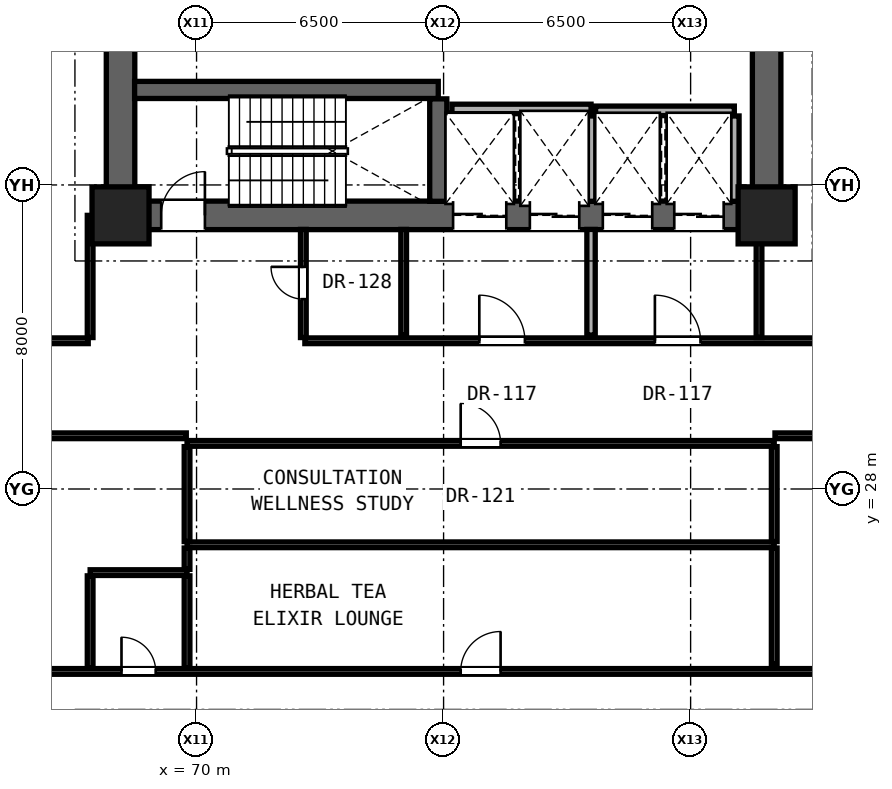
"""IFC4 building model, lengths in metres.
Left out: names, types, materials, properties, quantities, classifications, styles, units other than length and angle.
Written with IfcOpenShell. Run it as: python <this file> out.ifc"""

import sys

from ifc_helpers import new_model, si_unit, direction, frame, frame_2d, origin, origin_2d, place, context, subcontext, project, spatial, rectangle, extrude, element, fill, save


model = new_model("IFC4")
c1 = context("Model", 3, precision=1e-05, world=origin(), true_north=direction((0.0, 1.0)))
c2 = subcontext(c1, "Body", "Model", "MODEL_VIEW")
j1 = project(units=[si_unit("LENGTHUNIT", "METRE"), si_unit("PLANEANGLEUNIT", "RADIAN")], contexts=[c1])
p1 = place(None, origin())
s1 = spatial("IfcSite", under=j1, at=p1, CompositionType="ELEMENT")
p2 = place(p1, origin())
s2 = spatial("IfcBuilding", under=s1, at=p2, CompositionType="ELEMENT")
p3 = place(p2, frame((0.0, 0.0, 18.1)))
s3 = spatial("IfcBuildingStorey", under=s2, at=p3, CompositionType="ELEMENT", Elevation=18.1)
for number, where, z_axis, x_axis in (
    (1, (68.0, 35.2, 0.0), (0.0, 0.0, 1.0), (1.0, 0.0, 0.0)),
    (2, (85.0, 35.2, 0.0), (0.0, 0.0, 1.0), (1.0, 0.0, 0.0)),
):
    element("IfcColumn", number, at=place(p3, frame(where, z_axis=z_axis, x_axis=x_axis)), inside=s3, PredefinedType="COLUMN", context=c2, shape_type="SweptSolid", body=[
        extrude(rectangle(XDim=1.5, YDim=1.5, at=origin_2d()), origin(), (0.0, 0.0, 1.0), 4.3),
    ])
for number, where, z_axis, x_axis in (
    (3, (68.0, 35.2, 0.0), (0.0, 0.0, 1.0), (0.0, 1.0, 0.0)),
    (4, (85.0, 35.2, 0.0), (0.0, 0.0, 1.0), (0.0, 1.0, 0.0)),
):
    element("IfcWall", number, at=place(p3, frame(where, z_axis=z_axis, x_axis=x_axis)), inside=s3, PredefinedType="SHEAR", context=c2, shape_type="SweptSolid", body=[
        extrude(rectangle(XDim=5.6, YDim=0.75, at=frame_2d((2.8, 0.0))), origin(), (0.0, 0.0, 1.0), 3.65),
    ])
p4 = place(p3, frame((68.0, 35.2, 0.0), z_axis=(0.0, 0.0, 1.0), x_axis=(1.0, 0.0, 0.0)))
e5 = element("IfcWall", 5, at=p4, inside=s3, PredefinedType="SHEAR", context=c2, shape_type="SweptSolid", body=[
    extrude(rectangle(XDim=17.0, YDim=0.75, at=frame_2d((8.5, 0.0))), origin(), (0.0, 0.0, 1.0), 3.65),
])
p5 = place(p4, frame((1.07, 0.0, 0.0)))
e6 = element("IfcOpeningElement", 6, at=p5, cuts=e5, PredefinedType="OPENING", context=c2, shape_type="SweptSolid", body=[
    extrude(rectangle(XDim=1.15, YDim=2.2, at=frame_2d((0.575, 1.1))), frame((0.0, 0.385, 0.0), z_axis=(0.0, -1.0, 0.0), x_axis=(1.0, 0.0, 0.0)), (0.0, 0.0, 1.0), 0.77),
])
p6 = place(p4, frame((8.75, 0.0, 0.0)))
e7 = element("IfcOpeningElement", 7, at=p6, cuts=e5, PredefinedType="OPENING", context=c2, shape_type="SweptSolid", body=[
    extrude(rectangle(XDim=1.4, YDim=2.35, at=frame_2d((0.7, 1.175))), frame((0.0, 0.385, 0.0), z_axis=(0.0, -1.0, 0.0), x_axis=(1.0, 0.0, 0.0)), (0.0, 0.0, 1.0), 0.77),
])
p7 = place(p4, frame((10.77, 0.0, 0.0)))
e8 = element("IfcOpeningElement", 8, at=p7, cuts=e5, PredefinedType="OPENING", context=c2, shape_type="SweptSolid", body=[
    extrude(rectangle(XDim=1.3, YDim=2.3, at=frame_2d((0.65, 1.15))), frame((0.0, 0.385, 0.0), z_axis=(0.0, -1.0, 0.0), x_axis=(1.0, 0.0, 0.0)), (0.0, 0.0, 1.0), 0.77),
])
p8 = place(p4, frame((12.69, 0.0, 0.0)))
e9 = element("IfcOpeningElement", 9, at=p8, cuts=e5, PredefinedType="OPENING", context=c2, shape_type="SweptSolid", body=[
    extrude(rectangle(XDim=1.3, YDim=2.3, at=frame_2d((0.65, 1.15))), frame((0.0, 0.385, 0.0), z_axis=(0.0, -1.0, 0.0), x_axis=(1.0, 0.0, 0.0)), (0.0, 0.0, 1.0), 0.77),
])
p9 = place(p4, frame((14.57, 0.0, 0.0)))
e10 = element("IfcOpeningElement", 10, at=p9, cuts=e5, PredefinedType="OPENING", context=c2, shape_type="SweptSolid", body=[
    extrude(rectangle(XDim=1.3, YDim=2.3, at=frame_2d((0.65, 1.15))), frame((0.0, 0.385, 0.0), z_axis=(0.0, -1.0, 0.0), x_axis=(1.0, 0.0, 0.0)), (0.0, 0.0, 1.0), 0.77),
])
p10 = place(p3, frame((61.8, 23.2, 0.0), z_axis=(0.0, 0.0, 1.0), x_axis=(1.0, 0.0, 0.0)))
e11 = element("IfcWall", 11, at=p10, inside=s3, PredefinedType="PARTITIONING", context=c2, shape_type="SweptSolid", body=[
    extrude(rectangle(XDim=29.15, YDim=0.15, at=frame_2d((14.575, 0.0))), origin(), (0.0, 0.0, 1.0), 2.715),
])
p11 = place(p10, frame((6.225, 0.0, 0.0)))
e12 = element("IfcOpeningElement", 12, at=p11, cuts=e11, PredefinedType="OPENING", context=c2, shape_type="SweptSolid", body=[
    extrude(rectangle(XDim=0.9, YDim=2.1, at=frame_2d((0.45, 1.05))), frame((0.0, 0.085, 0.0), z_axis=(0.0, -1.0, 0.0), x_axis=(1.0, 0.0, 0.0)), (0.0, 0.0, 1.0), 0.17),
])
p12 = place(p10, frame((15.15, 0.0, 0.0)))
e13 = element("IfcOpeningElement", 13, at=p12, cuts=e11, PredefinedType="OPENING", context=c2, shape_type="SweptSolid", body=[
    extrude(rectangle(XDim=1.05, YDim=2.2, at=frame_2d((0.525, 1.1))), frame((0.0, 0.085, 0.0), z_axis=(0.0, -1.0, 0.0), x_axis=(1.0, 0.0, 0.0)), (0.0, 0.0, 1.0), 0.17),
])
p13 = place(p3, frame((67.2, 25.8, 0.0), z_axis=(0.0, 0.0, 1.0), x_axis=(1.0, 0.0, 0.0)))
e14 = element("IfcWall", 14, at=p13, inside=s3, PredefinedType="PARTITIONING", context=c2, shape_type="SweptSolid", body=[
    extrude(rectangle(XDim=2.55, YDim=0.15, at=frame_2d((1.275, 0.0))), origin(), (0.0, 0.0, 1.0), 2.715),
])
p14 = place(p3, frame((69.75, 26.532, 0.0), z_axis=(0.0, 0.0, 1.0), x_axis=(1.0, 0.0, 0.0)))
e15 = element("IfcWall", 15, at=p14, inside=s3, PredefinedType="PARTITIONING", context=c2, shape_type="SweptSolid", body=[
    extrude(rectangle(XDim=15.45, YDim=0.15, at=frame_2d((7.725, 0.0))), origin(), (0.0, 0.0, 1.0), 2.715),
])
p15 = place(p3, frame((69.75, 29.2, 0.0), z_axis=(0.0, 0.0, 1.0), x_axis=(1.0, 0.0, 0.0)))
e16 = element("IfcWall", 16, at=p15, inside=s3, PredefinedType="PARTITIONING", context=c2, shape_type="SweptSolid", body=[
    extrude(rectangle(XDim=15.45, YDim=0.15, at=frame_2d((7.725, 0.0))), origin(), (0.0, 0.0, 1.0), 2.715),
])
p16 = place(p15, frame((7.2, 0.0, 0.0)))
e17 = element("IfcOpeningElement", 17, at=p16, cuts=e16, PredefinedType="OPENING", context=c2, shape_type="SweptSolid", body=[
    extrude(rectangle(XDim=1.05, YDim=2.2, at=frame_2d((0.525, 1.1))), frame((0.0, 0.085, 0.0), z_axis=(0.0, -1.0, 0.0), x_axis=(1.0, 0.0, 0.0)), (0.0, 0.0, 1.0), 0.17),
])
p17 = place(p3, frame((61.8, 29.4, 0.0), z_axis=(0.0, 0.0, 1.0), x_axis=(1.0, 0.0, 0.0)))
e18 = element("IfcWall", 18, at=p17, inside=s3, PredefinedType="PARTITIONING", context=c2, shape_type="SweptSolid", body=[
    extrude(rectangle(XDim=7.93, YDim=0.15, at=frame_2d((3.965, 0.0))), origin(), (0.0, 0.0, 1.0), 2.715),
])
p18 = place(p3, frame((85.22, 29.4, 0.0), z_axis=(0.0, 0.0, 1.0), x_axis=(1.0, 0.0, 0.0)))
e19 = element("IfcWall", 19, at=p18, inside=s3, PredefinedType="PARTITIONING", context=c2, shape_type="SweptSolid", body=[
    extrude(rectangle(XDim=5.73, YDim=0.15, at=frame_2d((2.865, 0.0))), origin(), (0.0, 0.0, 1.0), 2.786),
])
p19 = place(p3, frame((61.8, 31.9, 0.0), z_axis=(0.0, 0.0, 1.0), x_axis=(1.0, 0.0, 0.0)))
e20 = element("IfcWall", 20, at=p19, inside=s3, PredefinedType="PARTITIONING", context=c2, shape_type="SweptSolid", body=[
    extrude(rectangle(XDim=5.35, YDim=0.15, at=frame_2d((2.675, 0.0))), origin(), (0.0, 0.0, 1.0), 3.65),
])
p20 = place(p3, frame((72.85, 31.9, 0.0), z_axis=(0.0, 0.0, 1.0), x_axis=(1.0, 0.0, 0.0)))
e21 = element("IfcWall", 21, at=p20, inside=s3, PredefinedType="PARTITIONING", context=c2, shape_type="SweptSolid", body=[
    extrude(rectangle(XDim=18.1, YDim=0.15, at=frame_2d((9.05, 0.0))), origin(), (0.0, 0.0, 1.0), 2.715),
])
p21 = place(p20, frame((9.21, 0.0, 0.0)))
e22 = element("IfcOpeningElement", 22, at=p21, cuts=e21, PredefinedType="OPENING", context=c2, shape_type="SweptSolid", body=[
    extrude(rectangle(XDim=1.2, YDim=2.25, at=frame_2d((0.6, 1.125))), frame((0.0, 0.085, 0.0), z_axis=(0.0, -1.0, 0.0), x_axis=(1.0, 0.0, 0.0)), (0.0, 0.0, 1.0), 0.17),
])
p22 = place(p20, frame((4.59, 0.0, 0.0)))
e23 = element("IfcOpeningElement", 23, at=p22, cuts=e21, PredefinedType="OPENING", context=c2, shape_type="SweptSolid", body=[
    extrude(rectangle(XDim=1.2, YDim=2.25, at=frame_2d((0.6, 1.125))), frame((0.0, 0.085, 0.0), z_axis=(0.0, -1.0, 0.0), x_axis=(1.0, 0.0, 0.0)), (0.0, 0.0, 1.0), 0.17),
])
p23 = place(p3, frame((80.5, 37.95, 0.0), z_axis=(0.0, 0.0, 1.0), x_axis=(1.0, 0.0, 0.0)))
e24 = element("IfcWall", 24, at=p23, inside=s3, PredefinedType="SOLIDWALL", context=c2, shape_type="SweptSolid", body=[
    extrude(rectangle(XDim=3.65, YDim=0.25, at=frame_2d((1.825, 0.0))), origin(), (0.0, 0.0, 1.0), 3.65),
])
p24 = place(p3, frame((76.72, 38.0, 0.0), z_axis=(0.0, 0.0, 1.0), x_axis=(1.0, 0.0, 0.0)))
e25 = element("IfcWall", 25, at=p24, inside=s3, PredefinedType="SOLIDWALL", context=c2, shape_type="SweptSolid", body=[
    extrude(rectangle(XDim=3.66, YDim=0.25, at=frame_2d((1.83, 0.0))), origin(), (0.0, 0.0, 1.0), 3.65),
])
p25 = place(p3, frame((68.37, 38.5, 0.0), z_axis=(0.0, 0.0, 1.0), x_axis=(1.0, 0.0, 0.0)))
e26 = element("IfcWall", 26, at=p25, inside=s3, PredefinedType="SHEAR", context=c2, shape_type="SweptSolid", body=[
    extrude(rectangle(XDim=7.99, YDim=0.45, at=frame_2d((3.995, 0.0))), origin(), (0.0, 0.0, 1.0), 3.65),
])
p26 = place(p3, frame((67.2, 23.285, 0.0), z_axis=(0.0, 0.0, 1.0), x_axis=(0.0, 1.0, 0.0)))
e27 = element("IfcWall", 27, at=p26, inside=s3, PredefinedType="PARTITIONING", context=c2, shape_type="SweptSolid", body=[
    extrude(rectangle(XDim=2.43, YDim=0.15, at=frame_2d((1.215, 0.0))), origin(), (0.0, 0.0, 1.0), 3.65),
])
p27 = place(p3, frame((67.2, 31.985, 0.0), z_axis=(0.0, 0.0, 1.0), x_axis=(0.0, 1.0, 0.0)))
e28 = element("IfcWall", 28, at=p27, inside=s3, PredefinedType="PARTITIONING", context=c2, shape_type="SweptSolid", body=[
    extrude(rectangle(XDim=3.215, YDim=0.15, at=frame_2d((1.607, 0.0))), origin(), (0.0, 0.0, 1.0), 2.542),
])
p28 = place(p3, frame((69.75, 23.285, 0.0), z_axis=(0.0, 0.0, 1.0), x_axis=(0.0, 1.0, 0.0)))
e29 = element("IfcWall", 29, at=p28, inside=s3, PredefinedType="PARTITIONING", context=c2, shape_type="SweptSolid", body=[
    extrude(rectangle(XDim=2.43, YDim=0.15, at=frame_2d((1.215, 0.0))), origin(), (0.0, 0.0, 1.0), 3.65),
])
p29 = place(p3, frame((69.75, 25.885, 0.0), z_axis=(0.0, 0.0, 1.0), x_axis=(0.0, 1.0, 0.0)))
e30 = element("IfcWall", 30, at=p29, inside=s3, PredefinedType="PARTITIONING", context=c2, shape_type="SweptSolid", body=[
    extrude(rectangle(XDim=0.562, YDim=0.15, at=frame_2d((0.281, 0.0))), origin(), (0.0, 0.0, 1.0), 3.65),
])
p30 = place(p3, frame((69.75, 26.617, 0.0), z_axis=(0.0, 0.0, 1.0), x_axis=(0.0, 1.0, 0.0)))
e31 = element("IfcWall", 31, at=p30, inside=s3, PredefinedType="PARTITIONING", context=c2, shape_type="SweptSolid", body=[
    extrude(rectangle(XDim=2.498, YDim=0.15, at=frame_2d((1.249, 0.0))), origin(), (0.0, 0.0, 1.0), 2.715),
])
p31 = place(p3, frame((72.81, 31.985, 0.0), z_axis=(0.0, 0.0, 1.0), x_axis=(0.0, 1.0, 0.0)))
e32 = element("IfcWall", 32, at=p31, inside=s3, PredefinedType="PARTITIONING", context=c2, shape_type="SweptSolid", body=[
    extrude(rectangle(XDim=2.845, YDim=0.15, at=frame_2d((1.422, 0.0))), origin(), (0.0, 0.0, 1.0), 3.65),
])
p32 = place(p31, frame((1.01, 0.0, 0.0)))
e33 = element("IfcOpeningElement", 33, at=p32, cuts=e32, PredefinedType="OPENING", context=c2, shape_type="SweptSolid", body=[
    extrude(rectangle(XDim=0.85, YDim=2.01, at=frame_2d((0.425, 1.005))), frame((0.0, 0.085, 0.0), z_axis=(0.0, -1.0, 0.0), x_axis=(1.0, 0.0, 0.0)), (0.0, 0.0, 1.0), 0.17),
])
p33 = place(p3, frame((75.45, 32.05, 0.0), z_axis=(0.0, 0.0, 1.0), x_axis=(0.0, 1.0, 0.0)))
e34 = element("IfcWall", 34, at=p33, inside=s3, PredefinedType="PARTITIONING", context=c2, shape_type="SweptSolid", body=[
    extrude(rectangle(XDim=2.78, YDim=0.15, at=frame_2d((1.39, 0.0))), origin(), (0.0, 0.0, 1.0), 3.65),
])
p34 = place(p3, frame((76.36, 35.57, 0.0), z_axis=(0.0, 0.0, 1.0), x_axis=(0.0, 1.0, 0.0)))
e35 = element("IfcWall", 35, at=p34, inside=s3, PredefinedType="SHEAR", context=c2, shape_type="SweptSolid", body=[
    extrude(rectangle(XDim=2.695, YDim=0.45, at=frame_2d((1.347, 0.0))), origin(), (0.0, 0.0, 1.0), 3.65),
])
p35 = place(p3, frame((80.38, 32.05, 0.0), z_axis=(0.0, 0.0, 1.0), x_axis=(0.0, 1.0, 0.0)))
e36 = element("IfcWall", 36, at=p35, inside=s3, PredefinedType="SOLIDWALL", context=c2, shape_type="SweptSolid", body=[
    extrude(rectangle(XDim=2.78, YDim=0.22, at=frame_2d((1.39, 0.0))), origin(), (0.0, 0.0, 1.0), 3.65),
])
for number, where, z_axis, x_axis in (
    (37, (80.38, 35.57, 0.0), (0.0, 0.0, 1.0), (0.0, 1.0, 0.0)),
    (38, (84.15, 35.57, 0.0), (0.0, 0.0, 1.0), (0.0, 1.0, 0.0)),
):
    element("IfcWall", number, at=place(p3, frame(where, z_axis=z_axis, x_axis=x_axis)), inside=s3, PredefinedType="SOLIDWALL", context=c2, shape_type="SweptSolid", body=[
        extrude(rectangle(XDim=2.245, YDim=0.25, at=frame_2d((1.123, 0.0))), origin(), (0.0, 0.0, 1.0), 3.65),
    ])
p36 = place(p3, frame((84.8, 31.985, 0.0), z_axis=(0.0, 0.0, 1.0), x_axis=(0.0, 1.0, 0.0)))
e39 = element("IfcWall", 39, at=p36, inside=s3, PredefinedType="PARTITIONING", context=c2, shape_type="SweptSolid", body=[
    extrude(rectangle(XDim=2.845, YDim=0.15, at=frame_2d((1.422, 0.0))), origin(), (0.0, 0.0, 1.0), 2.715),
])
p37 = place(p3, frame((85.2, 23.4, 0.0), z_axis=(0.0, 0.0, 1.0), x_axis=(0.0, 1.0, 0.0)))
e40 = element("IfcWall", 40, at=p37, inside=s3, PredefinedType="PARTITIONING", context=c2, shape_type="SweptSolid", body=[
    extrude(rectangle(XDim=3.047, YDim=0.15, at=frame_2d((1.523, 0.0))), origin(), (0.0, 0.0, 1.0), 2.715),
])
p38 = place(p3, frame((85.2, 26.617, 0.0), z_axis=(0.0, 0.0, 1.0), x_axis=(0.0, 1.0, 0.0)))
e41 = element("IfcWall", 41, at=p38, inside=s3, PredefinedType="PARTITIONING", context=c2, shape_type="SweptSolid", body=[
    extrude(rectangle(XDim=2.498, YDim=0.15, at=frame_2d((1.249, 0.0))), origin(), (0.0, 0.0, 1.0), 2.715),
])
p39 = place(p21, origin())
e42 = element("IfcDoor", 42, at=p39, inside=s3, OperationType="SINGLE_SWING_LEFT", PredefinedType="DOOR", context=c2, shape_type="SweptSolid", body=[
    extrude(rectangle(XDim=1.2, YDim=2.25, at=frame_2d((0.6, 1.125))), frame((0.0, 0.025, 0.0), z_axis=(0.0, -1.0, 0.0), x_axis=(1.0, 0.0, 0.0)), (0.0, 0.0, 1.0), 0.05),
])
fill(e22, e42)
p40 = place(p5, origin())
e43 = element("IfcDoor", 43, at=p40, inside=s3, OperationType="SINGLE_SWING_RIGHT", PredefinedType="DOOR", context=c2, shape_type="SweptSolid", body=[
    extrude(rectangle(XDim=1.15, YDim=2.2, at=frame_2d((0.575, 1.1))), frame((0.0, 0.025, 0.0), z_axis=(0.0, -1.0, 0.0), x_axis=(1.0, 0.0, 0.0)), (0.0, 0.0, 1.0), 0.05),
])
fill(e6, e43)
p41 = place(p22, origin())
e44 = element("IfcDoor", 44, at=p41, inside=s3, OperationType="SINGLE_SWING_LEFT", PredefinedType="DOOR", context=c2, shape_type="SweptSolid", body=[
    extrude(rectangle(XDim=1.2, YDim=2.25, at=frame_2d((0.6, 1.125))), frame((0.0, 0.025, 0.0), z_axis=(0.0, -1.0, 0.0), x_axis=(1.0, 0.0, 0.0)), (0.0, 0.0, 1.0), 0.05),
])
fill(e23, e44)
p42 = place(p32, origin())
e45 = element("IfcDoor", 45, at=p42, inside=s3, OperationType="SINGLE_SWING_RIGHT", PredefinedType="DOOR", context=c2, shape_type="SweptSolid", body=[
    extrude(rectangle(XDim=0.85, YDim=2.01, at=frame_2d((0.425, 1.005))), frame((0.0, 0.025, 0.0), z_axis=(0.0, -1.0, 0.0), x_axis=(1.0, 0.0, 0.0)), (0.0, 0.0, 1.0), 0.05),
])
fill(e33, e45)
p43 = place(p11, origin())
e46 = element("IfcDoor", 46, at=p43, inside=s3, OperationType="SINGLE_SWING_LEFT", PredefinedType="DOOR", context=c2, shape_type="SweptSolid", body=[
    extrude(rectangle(XDim=0.9, YDim=2.1, at=frame_2d((0.45, 1.05))), frame((0.0, 0.025, 0.0), z_axis=(0.0, -1.0, 0.0), x_axis=(1.0, 0.0, 0.0)), (0.0, 0.0, 1.0), 0.05),
])
fill(e12, e46)
p44 = place(p12, origin())
e47 = element("IfcDoor", 47, at=p44, inside=s3, OperationType="SINGLE_SWING_RIGHT", PredefinedType="DOOR", context=c2, shape_type="SweptSolid", body=[
    extrude(rectangle(XDim=1.05, YDim=2.2, at=frame_2d((0.525, 1.1))), frame((0.0, 0.025, 0.0), z_axis=(0.0, -1.0, 0.0), x_axis=(1.0, 0.0, 0.0)), (0.0, 0.0, 1.0), 0.05),
])
fill(e13, e47)
p45 = place(p16, origin())
e48 = element("IfcDoor", 48, at=p45, inside=s3, OperationType="SINGLE_SWING_LEFT", PredefinedType="DOOR", context=c2, shape_type="SweptSolid", body=[
    extrude(rectangle(XDim=1.05, YDim=2.2, at=frame_2d((0.525, 1.1))), frame((0.0, 0.025, 0.0), z_axis=(0.0, -1.0, 0.0), x_axis=(1.0, 0.0, 0.0)), (0.0, 0.0, 1.0), 0.05),
])
fill(e17, e48)
p46 = place(p6, origin())
e49 = element("IfcDoor", 49, at=p46, inside=s3, OperationType="DOUBLE_DOOR_SLIDING", PredefinedType="DOOR", context=c2, shape_type="SweptSolid", body=[
    extrude(rectangle(XDim=1.4, YDim=2.35, at=frame_2d((0.7, 1.175))), frame((0.0, 0.025, 0.0), z_axis=(0.0, -1.0, 0.0), x_axis=(1.0, 0.0, 0.0)), (0.0, 0.0, 1.0), 0.05),
])
fill(e7, e49)
p47 = place(p7, origin())
e50 = element("IfcDoor", 50, at=p47, inside=s3, OperationType="DOUBLE_DOOR_SLIDING", PredefinedType="DOOR", context=c2, shape_type="SweptSolid", body=[
    extrude(rectangle(XDim=1.3, YDim=2.3, at=frame_2d((0.65, 1.15))), frame((0.0, 0.025, 0.0), z_axis=(0.0, -1.0, 0.0), x_axis=(1.0, 0.0, 0.0)), (0.0, 0.0, 1.0), 0.05),
])
fill(e8, e50)
p48 = place(p8, origin())
e51 = element("IfcDoor", 51, at=p48, inside=s3, OperationType="DOUBLE_DOOR_SLIDING", PredefinedType="DOOR", context=c2, shape_type="SweptSolid", body=[
    extrude(rectangle(XDim=1.3, YDim=2.3, at=frame_2d((0.65, 1.15))), frame((0.0, 0.025, 0.0), z_axis=(0.0, -1.0, 0.0), x_axis=(1.0, 0.0, 0.0)), (0.0, 0.0, 1.0), 0.05),
])
fill(e9, e51)
p49 = place(p9, origin())
e52 = element("IfcDoor", 52, at=p49, inside=s3, OperationType="DOUBLE_DOOR_SLIDING", PredefinedType="DOOR", context=c2, shape_type="SweptSolid", body=[
    extrude(rectangle(XDim=1.3, YDim=2.3, at=frame_2d((0.65, 1.15))), frame((0.0, 0.025, 0.0), z_axis=(0.0, -1.0, 0.0), x_axis=(1.0, 0.0, 0.0)), (0.0, 0.0, 1.0), 0.05),
])
fill(e10, e52)
save(model, sys.argv[1])
